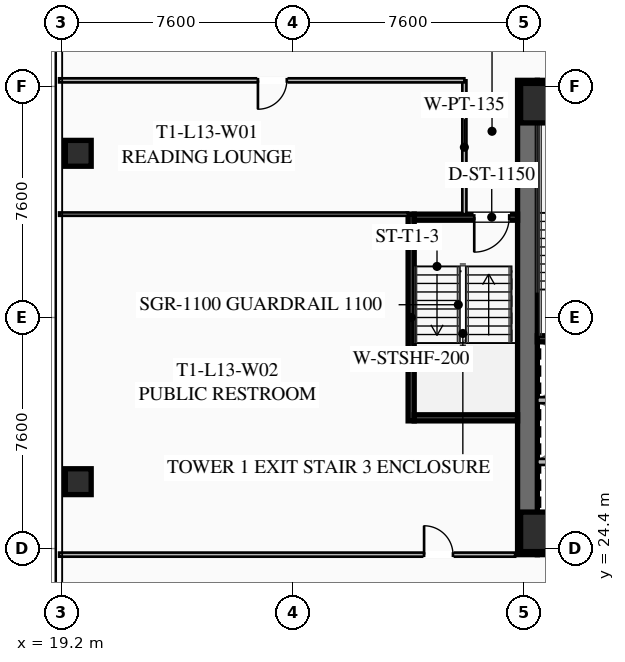
"""IFC4 building model, lengths in metres.
Left out: names, types, materials, properties, quantities, classifications, styles, units other than length and angle.
Written with IfcOpenShell. Run it as: python <this file> out.ifc"""

import sys

from ifc_helpers import new_model, si_unit, direction, frame, frame_2d, origin, origin_2d, place, context, subcontext, project, spatial, rectangle, hollow_rectangle, extrude, element, fill, save


model = new_model("IFC4")
c1 = context("Model", 3, precision=1e-05, world=origin(), true_north=direction((0.0, 1.0)))
c2 = subcontext(c1, "Body", "Model", "MODEL_VIEW")
j1 = project(units=[si_unit("LENGTHUNIT", "METRE"), si_unit("PLANEANGLEUNIT", "RADIAN")], contexts=[c1])
p1 = place(None, origin())
s1 = spatial("IfcSite", under=j1, at=p1, CompositionType="ELEMENT")
p2 = place(p1, origin())
s2 = spatial("IfcBuilding", under=s1, at=p2, CompositionType="ELEMENT")
p3 = place(p2, frame((0.0, 0.0, 53.0)))
s3 = spatial("IfcBuildingStorey", under=s2, at=p3, CompositionType="ELEMENT", Elevation=53.0)
p4 = place(p3, frame((34.525, 24.2, 0.0), z_axis=(0.0, 0.0, 1.0), x_axis=(0.0, 1.0, 0.0)))
e1 = element("IfcWall", 1, at=p4, inside=s3, PredefinedType="SHEAR", context=c2, shape_type="SweptSolid", body=[
    extrude(rectangle(XDim=15.6, YDim=0.65, at=frame_2d((7.8, 0.0))), origin(), (0.0, 0.0, 1.0), 3.55),
])
p5 = place(p3, frame((49.15, 24.525, 0.0), z_axis=(0.0, 0.0, 1.0), x_axis=(-1.0, 0.0, 0.0)))
e2 = element("IfcWall", 2, at=p5, inside=s3, PredefinedType="SHEAR", context=c2, shape_type="SweptSolid", body=[
    extrude(rectangle(XDim=14.3, YDim=0.65, at=frame_2d((7.15, 0.0))), origin(), (0.0, 0.0, 1.0), 3.55),
])
p6 = place(p5, frame((8.85, 0.0, 0.0)))
e3 = element("IfcOpeningElement", 3, at=p6, cuts=e2, PredefinedType="OPENING", context=c2, shape_type="SweptSolid", body=[
    extrude(rectangle(XDim=1.25, YDim=2.25, at=frame_2d((0.625, 1.125))), frame((0.0, 0.335, 0.0), z_axis=(0.0, -1.0, 0.0), x_axis=(1.0, 0.0, 0.0)), (0.0, 0.0, 1.0), 0.67),
])
p7 = place(p5, frame((3.8, 0.0, 0.0)))
e4 = element("IfcOpeningElement", 4, at=p7, cuts=e2, PredefinedType="OPENING", context=c2, shape_type="SweptSolid", body=[
    extrude(rectangle(XDim=1.25, YDim=2.25, at=frame_2d((0.625, 1.125))), frame((0.0, 0.335, 0.0), z_axis=(0.0, -1.0, 0.0), x_axis=(1.0, 0.0, 0.0)), (0.0, 0.0, 1.0), 0.67),
])
p8 = place(p3, frame((34.85, 39.475, 0.0), z_axis=(0.0, 0.0, 1.0), x_axis=(1.0, 0.0, 0.0)))
e5 = element("IfcWall", 5, at=p8, inside=s3, PredefinedType="SHEAR", context=c2, shape_type="SweptSolid", body=[
    extrude(rectangle(XDim=14.3, YDim=0.65, at=frame_2d((7.15, 0.0))), origin(), (0.0, 0.0, 1.0), 3.55),
])
p9 = place(p8, frame((4.2, 0.0, 0.0)))
e6 = element("IfcOpeningElement", 6, at=p9, cuts=e5, PredefinedType="OPENING", context=c2, shape_type="SweptSolid", body=[
    extrude(rectangle(XDim=1.25, YDim=2.25, at=frame_2d((0.625, 1.125))), frame((0.0, 0.335, 0.0), z_axis=(0.0, -1.0, 0.0), x_axis=(1.0, 0.0, 0.0)), (0.0, 0.0, 1.0), 0.67),
])
p10 = place(p8, frame((9.25, 0.0, 0.0)))
e7 = element("IfcOpeningElement", 7, at=p10, cuts=e5, PredefinedType="OPENING", context=c2, shape_type="SweptSolid", body=[
    extrude(rectangle(XDim=1.25, YDim=2.25, at=frame_2d((0.625, 1.125))), frame((0.0, 0.335, 0.0), z_axis=(0.0, -1.0, 0.0), x_axis=(1.0, 0.0, 0.0)), (0.0, 0.0, 1.0), 0.67),
])
for number, where, z_axis, x_axis in (
    (8, (34.95, 24.95, 0.0), (0.0, 0.0, 1.0), (1.0, 0.0, 0.0)),
    (9, (34.95, 39.05, 0.0), (0.0, 0.0, 1.0), (1.0, 0.0, 0.0)),
):
    element("IfcColumn", number, at=place(p3, frame(where, z_axis=z_axis, x_axis=x_axis)), inside=s3, PredefinedType="COLUMN", context=c2, shape_type="SweptSolid", body=[
        extrude(hollow_rectangle(XDim=1.3, YDim=1.3, WallThickness=0.05, at=origin_2d()), origin(), (0.0, 0.0, 1.0), 3.35),
    ])
for number, where, z_axis, x_axis in (
    (10, (19.75, 37.4, 0.0), (0.0, 0.0, 1.0), (1.0, 0.0, 0.0)),
    (11, (19.75, 26.6, 0.0), (0.0, 0.0, 1.0), (1.0, 0.0, 0.0)),
):
    element("IfcColumn", number, at=place(p3, frame(where, z_axis=z_axis, x_axis=x_axis)), inside=s3, PredefinedType="COLUMN", context=c2, shape_type="SweptSolid", body=[
        extrude(hollow_rectangle(XDim=0.85, YDim=0.85, WallThickness=0.035, at=origin_2d()), origin(), (0.0, 0.0, 1.0), 3.35),
    ])
for number, where, z_axis, x_axis in (
    (12, (34.85, 31.3, 0.0), (0.0, 0.0, 1.0), (1.0, 0.0, 0.0)),
    (13, (34.85, 38.7, 0.0), (0.0, 0.0, 1.0), (1.0, 0.0, 0.0)),
):
    element("IfcWall", number, at=place(p3, frame(where, z_axis=z_axis, x_axis=x_axis)), inside=s3, PredefinedType="SHEAR", context=c2, shape_type="SweptSolid", body=[
        extrude(rectangle(XDim=3.45, YDim=0.2, at=frame_2d((1.725, 0.0))), origin(), (0.0, 0.0, 1.0), 3.35),
    ])
for number, where, z_axis, x_axis in (
    (14, (34.85, 27.25, 0.0), (0.0, 0.0, 1.0), (1.0, 0.0, 0.0)),
    (15, (34.85, 29.28, 0.0), (0.0, 0.0, 1.0), (1.0, 0.0, 0.0)),
):
    element("IfcWall", number, at=place(p3, frame(where, z_axis=z_axis, x_axis=x_axis)), inside=s3, PredefinedType="SOLIDWALL", context=c2, shape_type="SweptSolid", body=[
        extrude(rectangle(XDim=3.1, YDim=0.2, at=frame_2d((1.55, 0.0))), origin(), (0.0, 0.0, 1.0), 3.35),
    ])
p11 = place(p3, frame((30.7, 28.6, 0.0), z_axis=(0.0, 0.0, 1.0), x_axis=(0.0, 1.0, 0.0)))
e16 = element("IfcWall", 16, at=p11, inside=s3, PredefinedType="SHEAR", context=c2, shape_type="SweptSolid", body=[
    extrude(rectangle(XDim=6.8, YDim=0.2, at=frame_2d((3.4, 0.0))), origin(), (0.0, 0.0, 1.0), 3.35),
])
p12 = place(p3, frame((34.2, 35.3, 0.0), z_axis=(0.0, 0.0, 1.0), x_axis=(-1.0, 0.0, 0.0)))
e17 = element("IfcWall", 17, at=p12, inside=s3, PredefinedType="SHEAR", context=c2, shape_type="SweptSolid", body=[
    extrude(rectangle(XDim=3.4, YDim=0.2, at=frame_2d((1.7, 0.0))), origin(), (0.0, 0.0, 1.0), 3.35),
])
p13 = place(p12, frame((0.275, 0.0, 0.0)))
e18 = element("IfcOpeningElement", 18, at=p13, cuts=e17, PredefinedType="OPENING", context=c2, shape_type="SweptSolid", body=[
    extrude(rectangle(XDim=1.15, YDim=2.2, at=frame_2d((0.575, 1.1))), frame((0.0, 0.11, 0.0), z_axis=(0.0, -1.0, 0.0), x_axis=(1.0, 0.0, 0.0)), (0.0, 0.0, 1.0), 0.22),
])
p14 = place(p3, frame((30.8, 28.7, 0.0), z_axis=(0.0, 0.0, 1.0), x_axis=(1.0, 0.0, 0.0)))
e19 = element("IfcWall", 19, at=p14, inside=s3, PredefinedType="SHEAR", context=c2, shape_type="SweptSolid", body=[
    extrude(rectangle(XDim=3.4, YDim=0.2, at=frame_2d((1.7, 0.0))), origin(), (0.0, 0.0, 1.0), 3.35),
])
p15 = place(p3, frame((32.45, 35.4, 0.0), z_axis=(0.0, 0.0, 1.0), x_axis=(0.0, 1.0, 0.0)))
e20 = element("IfcWall", 20, at=p15, inside=s3, PredefinedType="PARTITIONING", context=c2, shape_type="SweptSolid", body=[
    extrude(rectangle(XDim=4.4, YDim=0.135, at=frame_2d((2.2, 0.0))), origin(), (0.0, 0.0, 1.0), 2.703),
])
p16 = place(p3, frame((32.45, 39.8, 0.0), z_axis=(0.0, 0.0, 1.0), x_axis=(-1.0, 0.0, 0.0)))
e21 = element("IfcWall", 21, at=p16, inside=s3, PredefinedType="PARTITIONING", context=c2, shape_type="SweptSolid", body=[
    extrude(rectangle(XDim=13.33, YDim=0.135, at=frame_2d((6.665, 0.0))), origin(), (0.0, 0.0, 1.0), 2.703),
])
p17 = place(p16, frame((5.84, 0.0, 0.0)))
e22 = element("IfcOpeningElement", 22, at=p17, cuts=e21, PredefinedType="OPENING", context=c2, shape_type="SweptSolid", body=[
    extrude(rectangle(XDim=0.95, YDim=2.05, at=frame_2d((0.475, 1.025))), frame((0.0, 0.077, 0.0), z_axis=(0.0, -1.0, 0.0), x_axis=(1.0, 0.0, 0.0)), (0.0, 0.0, 1.0), 0.155),
])
p18 = place(p3, frame((19.12, 24.2, 0.0), z_axis=(0.0, 0.0, 1.0), x_axis=(1.0, 0.0, 0.0)))
e23 = element("IfcWall", 23, at=p18, inside=s3, PredefinedType="PARTITIONING", context=c2, shape_type="SweptSolid", body=[
    extrude(rectangle(XDim=15.0, YDim=0.135, at=frame_2d((7.5, 0.0))), origin(), (0.0, 0.0, 1.0), 2.703),
])
p19 = place(p18, frame((12.005, 0.0, 0.0)))
e24 = element("IfcOpeningElement", 24, at=p19, cuts=e23, PredefinedType="OPENING", context=c2, shape_type="SweptSolid", body=[
    extrude(rectangle(XDim=0.95, YDim=2.05, at=frame_2d((0.475, 1.025))), frame((0.0, 0.077, 0.0), z_axis=(0.0, -1.0, 0.0), x_axis=(1.0, 0.0, 0.0)), (0.0, 0.0, 1.0), 0.155),
])
p20 = place(p3, frame((30.6, 35.4, 0.0), z_axis=(0.0, 0.0, 1.0), x_axis=(-1.0, 0.0, 0.0)))
e25 = element("IfcWall", 25, at=p20, inside=s3, PredefinedType="PARTITIONING", context=c2, shape_type="SweptSolid", body=[
    extrude(rectangle(XDim=11.48, YDim=0.11, at=frame_2d((5.74, 0.0))), origin(), (0.0, 0.0, 1.0), 2.703),
])
p21 = place(p13, origin())
e26 = element("IfcDoor", 26, at=p21, inside=s3, OperationType="SINGLE_SWING_RIGHT", PredefinedType="DOOR", context=c2, shape_type="SweptSolid", body=[
    extrude(rectangle(XDim=1.15, YDim=2.2, at=frame_2d((0.575, 1.1))), frame((0.0, 0.025, 0.0), z_axis=(0.0, -1.0, 0.0), x_axis=(1.0, 0.0, 0.0)), (0.0, 0.0, 1.0), 0.05),
])
fill(e18, e26)
p22 = place(p17, origin())
e27 = element("IfcDoor", 27, at=p22, inside=s3, OperationType="SINGLE_SWING_RIGHT", PredefinedType="DOOR", context=c2, shape_type="SweptSolid", body=[
    extrude(rectangle(XDim=0.95, YDim=2.05, at=frame_2d((0.475, 1.025))), frame((0.0, 0.025, 0.0), z_axis=(0.0, -1.0, 0.0), x_axis=(1.0, 0.0, 0.0)), (0.0, 0.0, 1.0), 0.05),
])
fill(e22, e27)
p23 = place(p19, origin())
e28 = element("IfcDoor", 28, at=p23, inside=s3, OperationType="SINGLE_SWING_LEFT", PredefinedType="DOOR", context=c2, shape_type="SweptSolid", body=[
    extrude(rectangle(XDim=0.95, YDim=2.05, at=frame_2d((0.475, 1.025))), frame((0.0, 0.025, 0.0), z_axis=(0.0, -1.0, 0.0), x_axis=(1.0, 0.0, 0.0)), (0.0, 0.0, 1.0), 0.05),
])
fill(e24, e28)
save(model, sys.argv[1])
